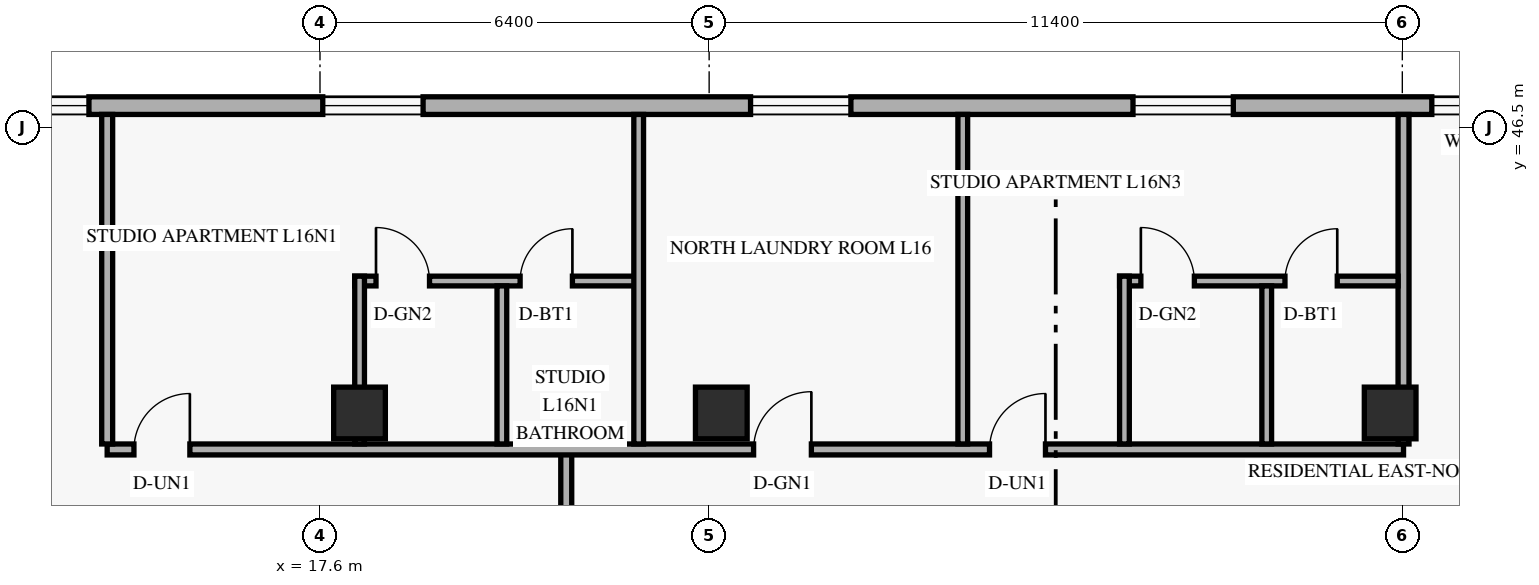
"""IFC4 building model, lengths in metres.
Left out: names, types, materials, properties, quantities, classifications, styles, units other than length and angle.
Written with IfcOpenShell. Run it as: python <this file> out.ifc"""

import sys

from ifc_helpers import new_model, si_unit, direction, frame, frame_2d, origin, origin_2d, place, context, subcontext, project, spatial, rectangle, extrude, element, fill, save


model = new_model("IFC4")
c1 = context("Model", 3, precision=1e-05, world=origin(), true_north=direction((0.0, 1.0)))
c2 = subcontext(c1, "Body", "Model", "MODEL_VIEW")
j1 = project(units=[si_unit("LENGTHUNIT", "METRE"), si_unit("PLANEANGLEUNIT", "RADIAN")], contexts=[c1])
p1 = place(None, origin())
s1 = spatial("IfcSite", under=j1, at=p1, CompositionType="ELEMENT")
p2 = place(p1, origin())
s2 = spatial("IfcBuilding", under=s1, at=p2, CompositionType="ELEMENT")
p3 = place(p2, frame((0.0, 0.0, 64.2)))
s3 = spatial("IfcBuildingStorey", under=s2, at=p3, CompositionType="ELEMENT", Elevation=64.2)
for number, where, z_axis, x_axis in (
    (1, (18.25, 41.8, 0.0), (0.0, 0.0, 1.0), (1.0, 0.0, 0.0)),
    (2, (24.2, 41.8, 0.0), (0.0, 0.0, 1.0), (1.0, 0.0, 0.0)),
    (3, (35.2, 41.8, 0.0), (0.0, 0.0, 1.0), (1.0, 0.0, 0.0)),
):
    element("IfcColumn", number, at=place(p3, frame(where, z_axis=z_axis, x_axis=x_axis)), inside=s3, PredefinedType="COLUMN", context=c2, shape_type="SweptSolid", body=[
        extrude(rectangle(XDim=0.85, YDim=0.85, at=origin_2d()), origin(), (0.0, 0.0, 1.0), 3.6),
    ])
p4 = place(p3, frame((44.98, 46.855, 0.0), z_axis=(0.0, 0.0, 1.0), x_axis=(-1.0, 0.0, 0.0)))
e4 = element("IfcWall", 4, at=p4, inside=s3, PredefinedType="SOLIDWALL", context=c2, shape_type="SweptSolid", body=[
    extrude(rectangle(XDim=39.56, YDim=0.29, at=frame_2d((19.78, 0.0))), origin(), (0.0, 0.0, 1.0), 3.36),
])
p5 = place(p4, frame((35.295, 0.0, 0.85)))
e5 = element("IfcOpeningElement", 5, at=p5, cuts=e4, PredefinedType="OPENING", context=c2, shape_type="SweptSolid", body=[
    extrude(rectangle(XDim=1.65, YDim=1.6, at=frame_2d((0.825, 0.8))), frame((0.0, 0.155, 0.0), z_axis=(0.0, -1.0, 0.0), x_axis=(1.0, 0.0, 0.0)), (0.0, 0.0, 1.0), 0.31),
])
p6 = place(p4, frame((31.18, 0.0, 0.85)))
e6 = element("IfcOpeningElement", 6, at=p6, cuts=e4, PredefinedType="OPENING", context=c2, shape_type="SweptSolid", body=[
    extrude(rectangle(XDim=1.2, YDim=1.5, at=frame_2d((0.6, 0.75))), frame((0.0, 0.155, 0.0), z_axis=(0.0, -1.0, 0.0), x_axis=(1.0, 0.0, 0.0)), (0.0, 0.0, 1.0), 0.31),
])
p7 = place(p4, frame((25.684, 0.0, 0.85)))
e7 = element("IfcOpeningElement", 7, at=p7, cuts=e4, PredefinedType="OPENING", context=c2, shape_type="SweptSolid", body=[
    extrude(rectangle(XDim=1.65, YDim=1.6, at=frame_2d((0.825, 0.8))), frame((0.0, 0.155, 0.0), z_axis=(0.0, -1.0, 0.0), x_axis=(1.0, 0.0, 0.0)), (0.0, 0.0, 1.0), 0.31),
])
p8 = place(p4, frame((18.649, 0.0, 0.85)))
e8 = element("IfcOpeningElement", 8, at=p8, cuts=e4, PredefinedType="OPENING", context=c2, shape_type="SweptSolid", body=[
    extrude(rectangle(XDim=1.65, YDim=1.6, at=frame_2d((0.825, 0.8))), frame((0.0, 0.155, 0.0), z_axis=(0.0, -1.0, 0.0), x_axis=(1.0, 0.0, 0.0)), (0.0, 0.0, 1.0), 0.31),
])
p9 = place(p4, frame((12.359, 0.0, 0.85)))
e9 = element("IfcOpeningElement", 9, at=p9, cuts=e4, PredefinedType="OPENING", context=c2, shape_type="SweptSolid", body=[
    extrude(rectangle(XDim=1.65, YDim=1.6, at=frame_2d((0.825, 0.8))), frame((0.0, 0.155, 0.0), z_axis=(0.0, -1.0, 0.0), x_axis=(1.0, 0.0, 0.0)), (0.0, 0.0, 1.0), 0.31),
])
p10 = place(p4, frame((7.895, 0.0, 0.85)))
e10 = element("IfcOpeningElement", 10, at=p10, cuts=e4, PredefinedType="OPENING", context=c2, shape_type="SweptSolid", body=[
    extrude(rectangle(XDim=1.2, YDim=1.5, at=frame_2d((0.6, 0.75))), frame((0.0, 0.155, 0.0), z_axis=(0.0, -1.0, 0.0), x_axis=(1.0, 0.0, 0.0)), (0.0, 0.0, 1.0), 0.31),
])
p11 = place(p4, frame((2.89, 0.0, 0.85)))
e11 = element("IfcOpeningElement", 11, at=p11, cuts=e4, PredefinedType="OPENING", context=c2, shape_type="SweptSolid", body=[
    extrude(rectangle(XDim=1.65, YDim=1.6, at=frame_2d((0.825, 0.8))), frame((0.0, 0.155, 0.0), z_axis=(0.0, -1.0, 0.0), x_axis=(1.0, 0.0, 0.0)), (0.0, 0.0, 1.0), 0.31),
])
p12 = place(p3, frame((21.65, 6.8, 0.0), z_axis=(0.0, 0.0, 1.0), x_axis=(0.0, 1.0, 0.0)))
e12 = element("IfcWall", 12, at=p12, inside=s3, PredefinedType="STANDARD", context=c2, shape_type="SweptSolid", body=[
    extrude(rectangle(XDim=34.4, YDim=0.18, at=frame_2d((17.2, 0.0))), origin(), (0.0, 0.0, 1.0), 2.649),
])
p13 = place(p3, frame((14.1, 41.2, 0.0), z_axis=(0.0, 0.0, 1.0), x_axis=(1.0, 0.0, 0.0)))
e13 = element("IfcWall", 13, at=p13, inside=s3, PredefinedType="STANDARD", context=c2, shape_type="SweptSolid", body=[
    extrude(rectangle(XDim=21.32, YDim=0.18, at=frame_2d((10.66, 0.0))), origin(), (0.0, 0.0, 1.0), 2.649),
])
p14 = place(p13, frame((0.44, 0.0, 0.0)))
e14 = element("IfcOpeningElement", 14, at=p14, cuts=e13, PredefinedType="OPENING", context=c2, shape_type="SweptSolid", body=[
    extrude(rectangle(XDim=0.92, YDim=2.15, at=frame_2d((0.46, 1.075))), frame((0.0, 0.1, 0.0), z_axis=(0.0, -1.0, 0.0), x_axis=(1.0, 0.0, 0.0)), (0.0, 0.0, 1.0), 0.2),
])
p15 = place(p13, frame((10.631, 0.0, 0.0)))
e15 = element("IfcOpeningElement", 15, at=p15, cuts=e13, PredefinedType="OPENING", context=c2, shape_type="SweptSolid", body=[
    extrude(rectangle(XDim=0.95, YDim=2.15, at=frame_2d((0.475, 1.075))), frame((0.0, 0.1, 0.0), z_axis=(0.0, -1.0, 0.0), x_axis=(1.0, 0.0, 0.0)), (0.0, 0.0, 1.0), 0.2),
])
p16 = place(p13, frame((14.511, 0.0, 0.0)))
e16 = element("IfcOpeningElement", 16, at=p16, cuts=e13, PredefinedType="OPENING", context=c2, shape_type="SweptSolid", body=[
    extrude(rectangle(XDim=0.92, YDim=2.15, at=frame_2d((0.46, 1.075))), frame((0.0, 0.1, 0.0), z_axis=(0.0, -1.0, 0.0), x_axis=(1.0, 0.0, 0.0)), (0.0, 0.0, 1.0), 0.2),
])
p17 = place(p3, frame((35.42, 41.29, 0.0), z_axis=(0.0, 0.0, 1.0), x_axis=(0.0, 1.0, 0.0)))
e17 = element("IfcWall", 17, at=p17, inside=s3, PredefinedType="PARTITIONING", context=c2, shape_type="SweptSolid", body=[
    extrude(rectangle(XDim=5.42, YDim=0.18, at=frame_2d((2.71, 0.0))), origin(), (0.0, 0.0, 1.0), 3.36),
])
p18 = place(p3, frame((14.1, 41.29, 0.0), z_axis=(0.0, 0.0, 1.0), x_axis=(0.0, 1.0, 0.0)))
e18 = element("IfcWall", 18, at=p18, inside=s3, PredefinedType="PARTITIONING", context=c2, shape_type="SweptSolid", body=[
    extrude(rectangle(XDim=5.42, YDim=0.18, at=frame_2d((2.71, 0.0))), origin(), (0.0, 0.0, 1.0), 2.809),
])
p19 = place(p3, frame((18.171, 43.97, 0.0), z_axis=(0.0, 0.0, 1.0), x_axis=(1.0, 0.0, 0.0)))
e19 = element("IfcWall", 19, at=p19, inside=s3, PredefinedType="PLUMBINGWALL", context=c2, shape_type="SweptSolid", body=[
    extrude(rectangle(XDim=4.67, YDim=0.16, at=frame_2d((2.335, 0.0))), origin(), (0.0, 0.0, 1.0), 3.36),
])
p20 = place(p19, frame((0.35, 0.0, 0.0)))
e20 = element("IfcOpeningElement", 20, at=p20, cuts=e19, PredefinedType="OPENING", context=c2, shape_type="SweptSolid", body=[
    extrude(rectangle(XDim=0.88, YDim=2.12, at=frame_2d((0.44, 1.06))), frame((0.0, 0.09, 0.0), z_axis=(0.0, -1.0, 0.0), x_axis=(1.0, 0.0, 0.0)), (0.0, 0.0, 1.0), 0.18),
])
p21 = place(p19, frame((2.72, 0.0, 0.0)))
e21 = element("IfcOpeningElement", 21, at=p21, cuts=e19, PredefinedType="OPENING", context=c2, shape_type="SweptSolid", body=[
    extrude(rectangle(XDim=0.86, YDim=2.12, at=frame_2d((0.43, 1.06))), frame((0.0, 0.09, 0.0), z_axis=(0.0, -1.0, 0.0), x_axis=(1.0, 0.0, 0.0)), (0.0, 0.0, 1.0), 0.18),
])
p22 = place(p3, frame((18.251, 41.29, 0.0), z_axis=(0.0, 0.0, 1.0), x_axis=(0.0, 1.0, 0.0)))
e22 = element("IfcWall", 22, at=p22, inside=s3, PredefinedType="PLUMBINGWALL", context=c2, shape_type="SweptSolid", body=[
    extrude(rectangle(XDim=2.76, YDim=0.16, at=frame_2d((1.38, 0.0))), origin(), (0.0, 0.0, 1.0), 2.649),
])
p23 = place(p3, frame((20.591, 41.29, 0.0), z_axis=(0.0, 0.0, 1.0), x_axis=(0.0, 1.0, 0.0)))
e23 = element("IfcWall", 23, at=p23, inside=s3, PredefinedType="PLUMBINGWALL", context=c2, shape_type="SweptSolid", body=[
    extrude(rectangle(XDim=2.6, YDim=0.16, at=frame_2d((1.3, 0.0))), origin(), (0.0, 0.0, 1.0), 2.809),
])
for number, where, z_axis, x_axis in (
    (24, (22.841, 41.29, 0.0), (0.0, 0.0, 1.0), (0.0, 1.0, 0.0)),
    (25, (28.171, 41.29, 0.0), (0.0, 0.0, 1.0), (0.0, 1.0, 0.0)),
):
    element("IfcWall", number, at=place(p3, frame(where, z_axis=z_axis, x_axis=x_axis)), inside=s3, PredefinedType="PARTITIONING", context=c2, shape_type="SweptSolid", body=[
        extrude(rectangle(XDim=5.42, YDim=0.16, at=frame_2d((2.71, 0.0))), origin(), (0.0, 0.0, 1.0), 2.809),
    ])
p24 = place(p3, frame((30.75, 43.97, 0.0), z_axis=(0.0, 0.0, 1.0), x_axis=(1.0, 0.0, 0.0)))
e26 = element("IfcWall", 26, at=p24, inside=s3, PredefinedType="PLUMBINGWALL", context=c2, shape_type="SweptSolid", body=[
    extrude(rectangle(XDim=4.58, YDim=0.16, at=frame_2d((2.29, 0.0))), origin(), (0.0, 0.0, 1.0), 3.36),
])
p25 = place(p24, frame((0.35, 0.0, 0.0)))
e27 = element("IfcOpeningElement", 27, at=p25, cuts=e26, PredefinedType="OPENING", context=c2, shape_type="SweptSolid", body=[
    extrude(rectangle(XDim=0.88, YDim=2.12, at=frame_2d((0.44, 1.06))), frame((0.0, 0.09, 0.0), z_axis=(0.0, -1.0, 0.0), x_axis=(1.0, 0.0, 0.0)), (0.0, 0.0, 1.0), 0.18),
])
p26 = place(p24, frame((2.72, 0.0, 0.0)))
e28 = element("IfcOpeningElement", 28, at=p26, cuts=e26, PredefinedType="OPENING", context=c2, shape_type="SweptSolid", body=[
    extrude(rectangle(XDim=0.86, YDim=2.12, at=frame_2d((0.43, 1.06))), frame((0.0, 0.09, 0.0), z_axis=(0.0, -1.0, 0.0), x_axis=(1.0, 0.0, 0.0)), (0.0, 0.0, 1.0), 0.18),
])
p27 = place(p3, frame((30.83, 41.29, 0.0), z_axis=(0.0, 0.0, 1.0), x_axis=(0.0, 1.0, 0.0)))
e29 = element("IfcWall", 29, at=p27, inside=s3, PredefinedType="PLUMBINGWALL", context=c2, shape_type="SweptSolid", body=[
    extrude(rectangle(XDim=2.76, YDim=0.16, at=frame_2d((1.38, 0.0))), origin(), (0.0, 0.0, 1.0), 2.809),
])
p28 = place(p3, frame((33.17, 41.29, 0.0), z_axis=(0.0, 0.0, 1.0), x_axis=(0.0, 1.0, 0.0)))
e30 = element("IfcWall", 30, at=p28, inside=s3, PredefinedType="PLUMBINGWALL", context=c2, shape_type="SweptSolid", body=[
    extrude(rectangle(XDim=2.6, YDim=0.16, at=frame_2d((1.3, 0.0))), origin(), (0.0, 0.0, 1.0), 2.809),
])
p29 = place(p6, origin())
e31 = element("IfcWindow", 31, at=p29, inside=s3, PartitioningType="SINGLE_PANEL", PredefinedType="WINDOW", context=c2, shape_type="SweptSolid", body=[
    extrude(rectangle(XDim=1.2, YDim=1.5, at=frame_2d((0.6, 0.75))), frame((0.0, 0.03, 0.0), z_axis=(0.0, -1.0, 0.0), x_axis=(1.0, 0.0, 0.0)), (0.0, 0.0, 1.0), 0.06),
])
fill(e6, e31)
p30 = place(p7, origin())
e32 = element("IfcWindow", 32, at=p30, inside=s3, PartitioningType="SINGLE_PANEL", PredefinedType="WINDOW", context=c2, shape_type="SweptSolid", body=[
    extrude(rectangle(XDim=1.65, YDim=1.6, at=frame_2d((0.825, 0.8))), frame((0.0, 0.03, 0.0), z_axis=(0.0, -1.0, 0.0), x_axis=(1.0, 0.0, 0.0)), (0.0, 0.0, 1.0), 0.06),
])
fill(e7, e32)
p31 = place(p8, origin())
e33 = element("IfcWindow", 33, at=p31, inside=s3, PartitioningType="SINGLE_PANEL", PredefinedType="WINDOW", context=c2, shape_type="SweptSolid", body=[
    extrude(rectangle(XDim=1.65, YDim=1.6, at=frame_2d((0.825, 0.8))), frame((0.0, 0.03, 0.0), z_axis=(0.0, -1.0, 0.0), x_axis=(1.0, 0.0, 0.0)), (0.0, 0.0, 1.0), 0.06),
])
fill(e8, e33)
p32 = place(p9, origin())
e34 = element("IfcWindow", 34, at=p32, inside=s3, PartitioningType="SINGLE_PANEL", PredefinedType="WINDOW", context=c2, shape_type="SweptSolid", body=[
    extrude(rectangle(XDim=1.65, YDim=1.6, at=frame_2d((0.825, 0.8))), frame((0.0, 0.03, 0.0), z_axis=(0.0, -1.0, 0.0), x_axis=(1.0, 0.0, 0.0)), (0.0, 0.0, 1.0), 0.06),
])
fill(e9, e34)
p33 = place(p10, origin())
e35 = element("IfcWindow", 35, at=p33, inside=s3, PartitioningType="SINGLE_PANEL", PredefinedType="WINDOW", context=c2, shape_type="SweptSolid", body=[
    extrude(rectangle(XDim=1.2, YDim=1.5, at=frame_2d((0.6, 0.75))), frame((0.0, 0.03, 0.0), z_axis=(0.0, -1.0, 0.0), x_axis=(1.0, 0.0, 0.0)), (0.0, 0.0, 1.0), 0.06),
])
fill(e10, e35)
p34 = place(p14, origin())
e36 = element("IfcDoor", 36, at=p34, inside=s3, OperationType="SINGLE_SWING_RIGHT", PredefinedType="DOOR", context=c2, shape_type="SweptSolid", body=[
    extrude(rectangle(XDim=0.92, YDim=2.15, at=frame_2d((0.46, 1.075))), frame((0.0, 0.025, 0.0), z_axis=(0.0, -1.0, 0.0), x_axis=(1.0, 0.0, 0.0)), (0.0, 0.0, 1.0), 0.05),
])
fill(e14, e36)
p35 = place(p20, origin())
e37 = element("IfcDoor", 37, at=p35, inside=s3, OperationType="SINGLE_SWING_LEFT", PredefinedType="DOOR", context=c2, shape_type="SweptSolid", body=[
    extrude(rectangle(XDim=0.88, YDim=2.12, at=frame_2d((0.44, 1.06))), frame((0.0, 0.025, 0.0), z_axis=(0.0, -1.0, 0.0), x_axis=(1.0, 0.0, 0.0)), (0.0, 0.0, 1.0), 0.05),
])
fill(e20, e37)
p36 = place(p21, origin())
e38 = element("IfcDoor", 38, at=p36, inside=s3, OperationType="SINGLE_SWING_RIGHT", PredefinedType="DOOR", context=c2, shape_type="SweptSolid", body=[
    extrude(rectangle(XDim=0.86, YDim=2.12, at=frame_2d((0.43, 1.06))), frame((0.0, 0.025, 0.0), z_axis=(0.0, -1.0, 0.0), x_axis=(1.0, 0.0, 0.0)), (0.0, 0.0, 1.0), 0.05),
])
fill(e21, e38)
p37 = place(p15, origin())
e39 = element("IfcDoor", 39, at=p37, inside=s3, OperationType="SINGLE_SWING_RIGHT", PredefinedType="DOOR", context=c2, shape_type="SweptSolid", body=[
    extrude(rectangle(XDim=0.95, YDim=2.15, at=frame_2d((0.475, 1.075))), frame((0.0, 0.025, 0.0), z_axis=(0.0, -1.0, 0.0), x_axis=(1.0, 0.0, 0.0)), (0.0, 0.0, 1.0), 0.05),
])
fill(e15, e39)
p38 = place(p16, origin())
e40 = element("IfcDoor", 40, at=p38, inside=s3, OperationType="SINGLE_SWING_RIGHT", PredefinedType="DOOR", context=c2, shape_type="SweptSolid", body=[
    extrude(rectangle(XDim=0.92, YDim=2.15, at=frame_2d((0.46, 1.075))), frame((0.0, 0.025, 0.0), z_axis=(0.0, -1.0, 0.0), x_axis=(1.0, 0.0, 0.0)), (0.0, 0.0, 1.0), 0.05),
])
fill(e16, e40)
p39 = place(p25, origin())
e41 = element("IfcDoor", 41, at=p39, inside=s3, OperationType="SINGLE_SWING_LEFT", PredefinedType="DOOR", context=c2, shape_type="SweptSolid", body=[
    extrude(rectangle(XDim=0.88, YDim=2.12, at=frame_2d((0.44, 1.06))), frame((0.0, 0.025, 0.0), z_axis=(0.0, -1.0, 0.0), x_axis=(1.0, 0.0, 0.0)), (0.0, 0.0, 1.0), 0.05),
])
fill(e27, e41)
p40 = place(p26, origin())
e42 = element("IfcDoor", 42, at=p40, inside=s3, OperationType="SINGLE_SWING_RIGHT", PredefinedType="DOOR", context=c2, shape_type="SweptSolid", body=[
    extrude(rectangle(XDim=0.86, YDim=2.12, at=frame_2d((0.43, 1.06))), frame((0.0, 0.025, 0.0), z_axis=(0.0, -1.0, 0.0), x_axis=(1.0, 0.0, 0.0)), (0.0, 0.0, 1.0), 0.05),
])
fill(e28, e42)
save(model, sys.argv[1])
